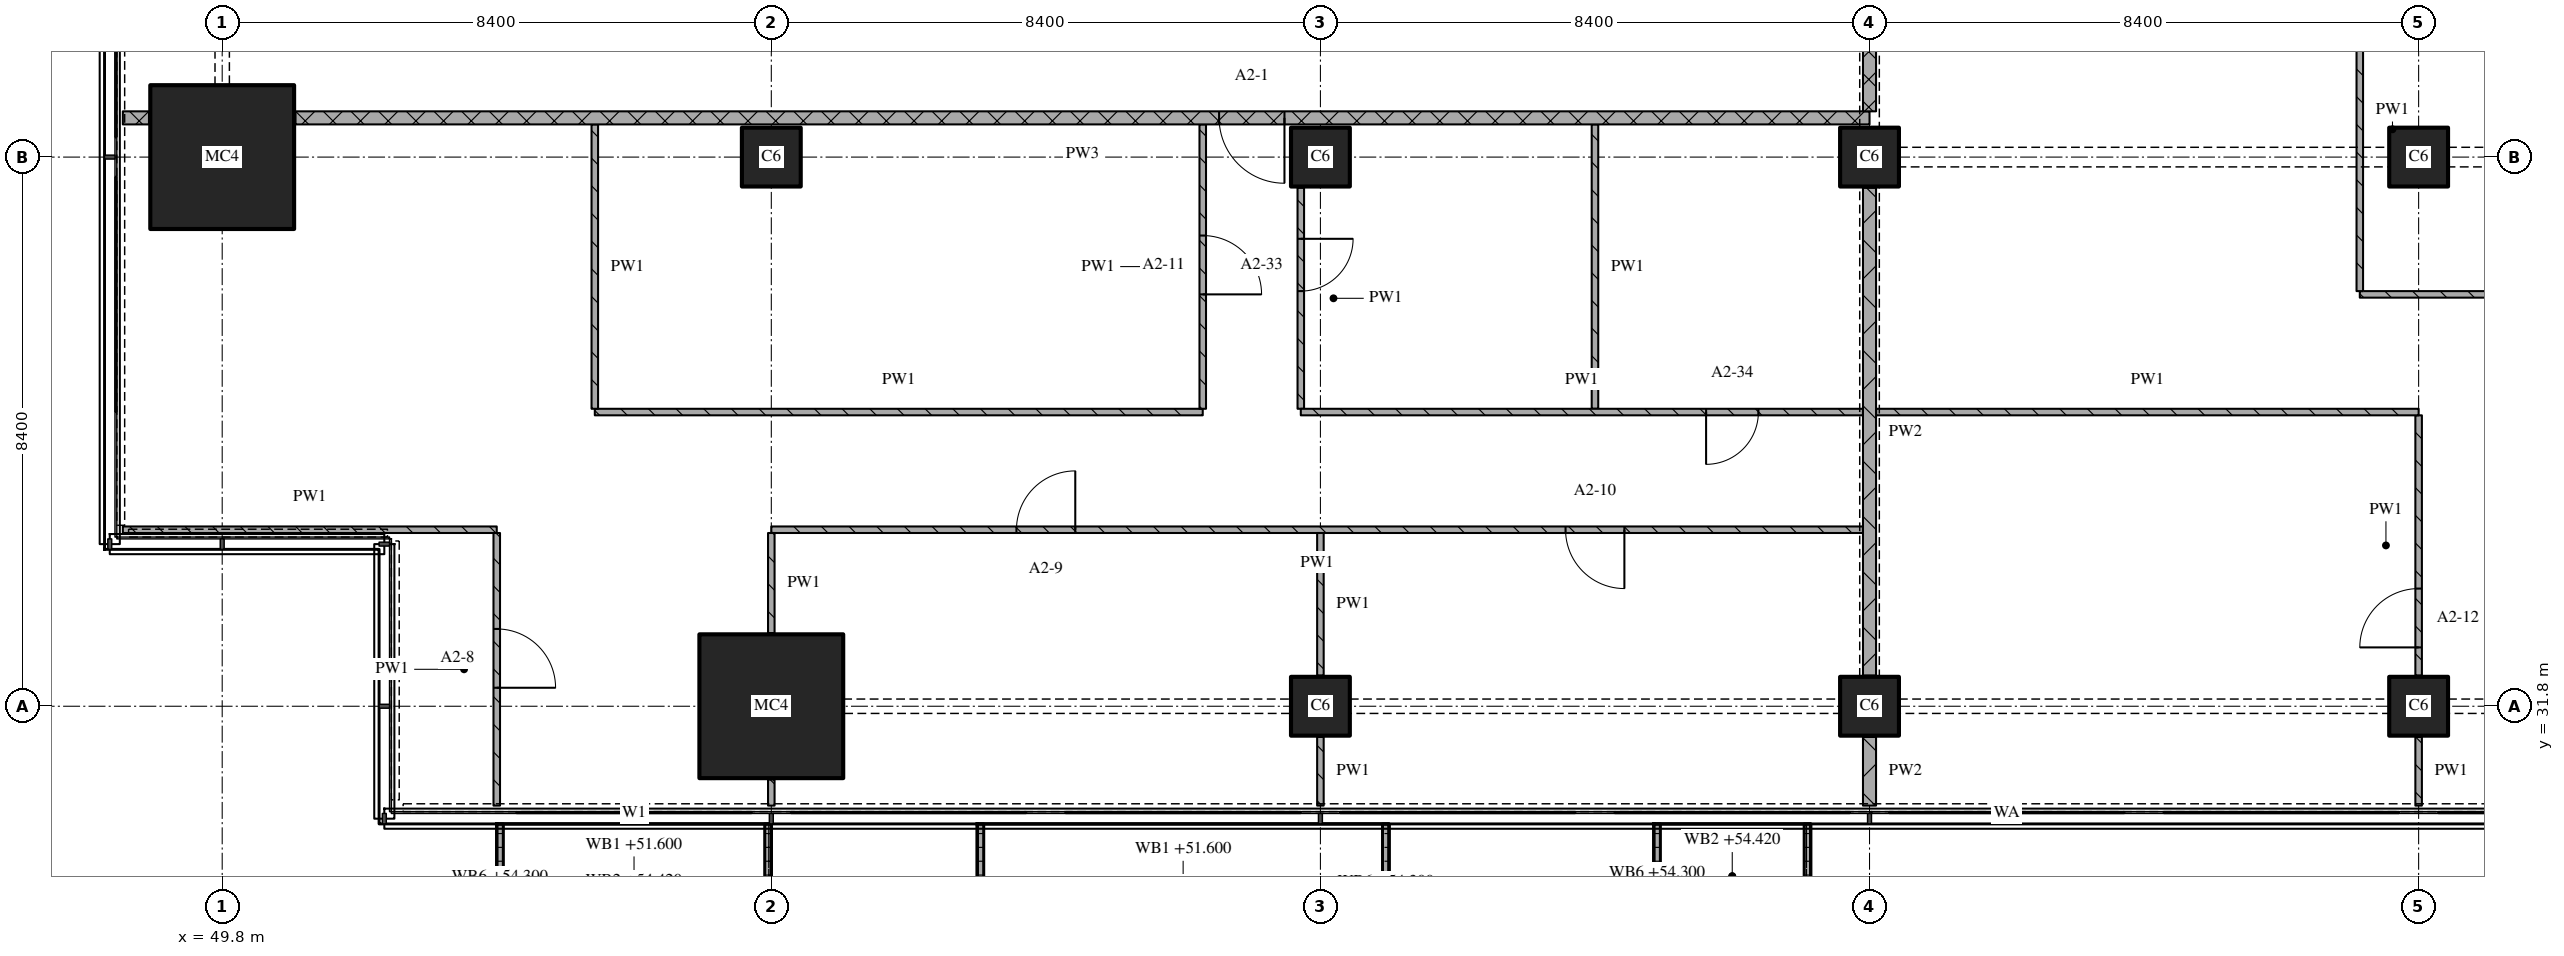
"""IFC4 building model, lengths in metres.
Left out: names, types, materials, properties, quantities, classifications, styles, units other than length and angle.
Written with IfcOpenShell. Run it as: python <this file> out.ifc"""

import sys

from ifc_helpers import new_model, si_unit, direction, frame, frame_2d, origin, origin_2d, place, context, subcontext, project, spatial, polyline, rectangle, outline, extrude, element, fill, save


model = new_model("IFC4")
c1 = context("Model", 3, precision=1e-05, world=origin(), true_north=direction((0.0, 1.0)))
c2 = subcontext(c1, "Body", "Model", "MODEL_VIEW")
j1 = project(units=[si_unit("LENGTHUNIT", "METRE"), si_unit("PLANEANGLEUNIT", "RADIAN")], contexts=[c1])
p1 = place(None, origin())
s1 = spatial("IfcSite", under=j1, at=p1, CompositionType="ELEMENT")
p2 = place(p1, origin())
s2 = spatial("IfcBuilding", under=s1, at=p2, CompositionType="ELEMENT")
p3 = place(p2, frame((0.0, 0.0, 51.6)))
s3 = spatial("IfcBuildingStorey", under=s2, at=p3, CompositionType="ELEMENT", Elevation=51.6)
for number, where, z_axis, x_axis in (
    (1, (49.8, 40.2, 0.0), (0.0, 0.0, 1.0), (1.0, 0.0, 0.0)),
    (2, (58.2, 31.8, 0.0), (0.0, 0.0, 1.0), (1.0, 0.0, 0.0)),
):
    element("IfcColumn", number, at=place(p3, frame(where, z_axis=z_axis, x_axis=x_axis)), inside=s3, PredefinedType="COLUMN", context=c2, shape_type="SweptSolid", body=[
        extrude(rectangle(XDim=2.2, YDim=2.2, at=origin_2d()), origin(), (0.0, 0.0, 1.0), 3.6),
    ])
for number, where, z_axis, x_axis in (
    (3, (58.2, 40.2, 0.0), (0.0, 0.0, 1.0), (1.0, 0.0, 0.0)),
    (4, (66.6, 31.8, 0.0), (0.0, 0.0, 1.0), (1.0, 0.0, 0.0)),
    (5, (66.6, 40.2, 0.0), (0.0, 0.0, 1.0), (1.0, 0.0, 0.0)),
    (6, (75.0, 31.8, 0.0), (0.0, 0.0, 1.0), (1.0, 0.0, 0.0)),
    (7, (75.0, 40.2, 0.0), (0.0, 0.0, 1.0), (1.0, 0.0, 0.0)),
    (8, (83.4, 31.8, 0.0), (0.0, 0.0, 1.0), (1.0, 0.0, 0.0)),
    (9, (83.4, 40.2, 0.0), (0.0, 0.0, 1.0), (1.0, 0.0, 0.0)),
):
    element("IfcColumn", number, at=place(p3, frame(where, z_axis=z_axis, x_axis=x_axis)), inside=s3, PredefinedType="COLUMN", context=c2, shape_type="SweptSolid", body=[
        extrude(rectangle(XDim=0.9, YDim=0.9, at=origin_2d()), origin(), (0.0, 0.0, 1.0), 3.6),
    ])
p4 = place(p3, origin())
e10 = element("IfcWall", 10, at=p4, inside=s3, PredefinedType="SOLIDWALL", context=c2, shape_type="SweptSolid", body=[
    extrude(outline(polyline([(54.0, 30.0), (54.1, 30.0), (54.1, 28.367), (58.1, 28.367), (58.1, 30.0), (58.2, 30.0), (58.2, 28.267), (54.0, 28.267), (54.0, 30.0)])), origin(), (0.0, 0.0, 1.0), 1.0),
])
p5 = place(p3, origin())
e11 = element("IfcWall", 11, at=p5, inside=s3, PredefinedType="SOLIDWALL", context=c2, shape_type="SweptSolid", body=[
    extrude(outline(polyline([(61.35, 30.0), (61.45, 30.0), (61.45, 28.233), (67.55, 28.233), (67.55, 30.0), (67.65, 30.0), (67.65, 28.133), (61.35, 28.133), (61.35, 30.0)])), origin(), (0.0, 0.0, 1.0), 1.0),
])
p6 = place(p3, origin())
e12 = element("IfcWall", 12, at=p6, inside=s3, PredefinedType="SOLIDWALL", context=c2, shape_type="SweptSolid", body=[
    extrude(outline(polyline([(71.7, 30.0), (71.8, 30.0), (71.8, 28.5), (74.0, 28.5), (74.0, 30.0), (74.1, 30.0), (74.1, 28.4), (71.7, 28.4), (71.7, 30.0)])), origin(), (0.0, 0.0, 1.0), 1.0),
])
p7 = place(p3, frame((48.28, 34.5, 0.0), z_axis=(0.0, 0.0, 1.0), x_axis=(1.0, 0.0, 0.0)))
e13 = element("IfcWall", 13, at=p7, inside=s3, PredefinedType="PARTITIONING", context=c2, shape_type="SweptSolid", body=[
    extrude(rectangle(XDim=5.72, YDim=0.1, at=frame_2d((2.86, 0.0))), origin(), (0.0, 0.0, 1.0), 3.32),
])
p8 = place(p3, frame((74.9, 34.5, 0.0), z_axis=(0.0, 0.0, 1.0), x_axis=(-1.0, 0.0, 0.0)))
e14 = element("IfcWall", 14, at=p8, inside=s3, PredefinedType="PARTITIONING", context=c2, shape_type="SweptSolid", body=[
    extrude(rectangle(XDim=16.7, YDim=0.1, at=frame_2d((8.35, 0.0))), origin(), (0.0, 0.0, 1.0), 3.32),
])
p9 = place(p8, frame((3.65, 0.0, 0.0)))
e15 = element("IfcOpeningElement", 15, at=p9, cuts=e14, PredefinedType="OPENING", context=c2, shape_type="SweptSolid", body=[
    extrude(rectangle(XDim=0.9, YDim=2.1, at=frame_2d((0.45, 1.05))), frame((0.0, 0.06, 0.0), z_axis=(0.0, -1.0, 0.0), x_axis=(1.0, 0.0, 0.0)), (0.0, 0.0, 1.0), 0.12),
])
p10 = place(p8, frame((12.05, 0.0, 0.0)))
e16 = element("IfcOpeningElement", 16, at=p10, cuts=e14, PredefinedType="OPENING", context=c2, shape_type="SweptSolid", body=[
    extrude(rectangle(XDim=0.9, YDim=2.1, at=frame_2d((0.45, 1.05))), frame((0.0, 0.06, 0.0), z_axis=(0.0, -1.0, 0.0), x_axis=(1.0, 0.0, 0.0)), (0.0, 0.0, 1.0), 0.12),
])
p11 = place(p3, frame((55.5, 36.3, 0.0), z_axis=(0.0, 0.0, 1.0), x_axis=(1.0, 0.0, 0.0)))
e17 = element("IfcWall", 17, at=p11, inside=s3, PredefinedType="PARTITIONING", context=c2, shape_type="SweptSolid", body=[
    extrude(rectangle(XDim=9.3, YDim=0.1, at=frame_2d((4.65, 0.0))), origin(), (0.0, 0.0, 1.0), 3.32),
])
p12 = place(p3, frame((82.5, 38.1, 0.0), z_axis=(0.0, 0.0, 1.0), x_axis=(1.0, 0.0, 0.0)))
e18 = element("IfcWall", 18, at=p12, inside=s3, PredefinedType="PARTITIONING", context=c2, shape_type="SweptSolid", body=[
    extrude(rectangle(XDim=8.4, YDim=0.1, at=frame_2d((4.2, 0.0))), origin(), (0.0, 0.0, 1.0), 3.32),
])
p13 = place(p3, frame((48.28, 40.8, 0.0), z_axis=(0.0, 0.0, 1.0), x_axis=(1.0, 0.0, 0.0)))
e19 = element("IfcWall", 19, at=p13, inside=s3, PredefinedType="PARTITIONING", context=c2, shape_type="SweptSolid", body=[
    extrude(rectangle(XDim=0.4, YDim=0.2, at=frame_2d((0.2, 0.0))), origin(), (0.0, 0.0, 1.0), 3.32),
])
p14 = place(p3, frame((75.0, 40.8, 0.0), z_axis=(0.0, 0.0, 1.0), x_axis=(-1.0, 0.0, 0.0)))
e20 = element("IfcWall", 20, at=p14, inside=s3, PredefinedType="PARTITIONING", context=c2, shape_type="SweptSolid", body=[
    extrude(rectangle(XDim=24.08, YDim=0.2, at=frame_2d((12.04, 0.0))), origin(), (0.0, 0.0, 1.0), 3.32),
])
p15 = place(p14, frame((8.95, 0.0, 0.0)))
e21 = element("IfcOpeningElement", 21, at=p15, cuts=e20, PredefinedType="OPENING", context=c2, shape_type="SweptSolid", body=[
    extrude(rectangle(XDim=1.0, YDim=2.1, at=frame_2d((0.5, 1.05))), frame((0.0, 0.11, 0.0), z_axis=(0.0, -1.0, 0.0), x_axis=(1.0, 0.0, 0.0)), (0.0, 0.0, 1.0), 0.22),
])
p16 = place(p3, frame((54.0, 30.28, 0.0), z_axis=(0.0, 0.0, 1.0), x_axis=(0.0, 1.0, 0.0)))
e22 = element("IfcWall", 22, at=p16, inside=s3, PredefinedType="PARTITIONING", context=c2, shape_type="SweptSolid", body=[
    extrude(rectangle(XDim=4.17, YDim=0.1, at=frame_2d((2.085, 0.0))), origin(), (0.0, 0.0, 1.0), 3.32),
])
p17 = place(p16, frame((1.803, 0.0, 0.0)))
e23 = element("IfcOpeningElement", 23, at=p17, cuts=e22, PredefinedType="OPENING", context=c2, shape_type="SweptSolid", body=[
    extrude(rectangle(XDim=0.9, YDim=2.1, at=frame_2d((0.45, 1.05))), frame((0.0, 0.06, 0.0), z_axis=(0.0, -1.0, 0.0), x_axis=(1.0, 0.0, 0.0)), (0.0, 0.0, 1.0), 0.12),
])
p18 = place(p3, frame((55.5, 40.7, 0.0), z_axis=(0.0, 0.0, 1.0), x_axis=(0.0, -1.0, 0.0)))
e24 = element("IfcWall", 24, at=p18, inside=s3, PredefinedType="PARTITIONING", context=c2, shape_type="SweptSolid", body=[
    extrude(rectangle(XDim=4.35, YDim=0.1, at=frame_2d((2.175, 0.0))), origin(), (0.0, 0.0, 1.0), 3.32),
])
p19 = place(p3, frame((58.2, 30.68, 0.0), z_axis=(0.0, 0.0, 1.0), x_axis=(0.0, -1.0, 0.0)))
e25 = element("IfcWall", 25, at=p19, inside=s3, PredefinedType="PARTITIONING", context=c2, shape_type="SweptSolid", body=[
    extrude(rectangle(XDim=0.4, YDim=0.1, at=frame_2d((0.2, 0.0))), origin(), (0.0, 0.0, 1.0), 3.32),
])
p20 = place(p3, frame((58.2, 34.45, 0.0), z_axis=(0.0, 0.0, 1.0), x_axis=(0.0, -1.0, 0.0)))
e26 = element("IfcWall", 26, at=p20, inside=s3, PredefinedType="PARTITIONING", context=c2, shape_type="SweptSolid", body=[
    extrude(rectangle(XDim=1.53, YDim=0.1, at=frame_2d((0.765, 0.0))), origin(), (0.0, 0.0, 1.0), 3.32),
])
p21 = place(p3, frame((64.8, 36.35, 0.0), z_axis=(0.0, 0.0, 1.0), x_axis=(0.0, 1.0, 0.0)))
e27 = element("IfcWall", 27, at=p21, inside=s3, PredefinedType="PARTITIONING", context=c2, shape_type="SweptSolid", body=[
    extrude(rectangle(XDim=4.35, YDim=0.1, at=frame_2d((2.175, 0.0))), origin(), (0.0, 0.0, 1.0), 3.32),
])
p22 = place(p21, frame((1.75, 0.0, 0.0)))
e28 = element("IfcOpeningElement", 28, at=p22, cuts=e27, PredefinedType="OPENING", context=c2, shape_type="SweptSolid", body=[
    extrude(rectangle(XDim=0.9, YDim=2.1, at=frame_2d((0.45, 1.05))), frame((0.0, 0.06, 0.0), z_axis=(0.0, -1.0, 0.0), x_axis=(1.0, 0.0, 0.0)), (0.0, 0.0, 1.0), 0.12),
])
p23 = place(p3, frame((66.3, 39.73, 0.0), z_axis=(0.0, 0.0, 1.0), x_axis=(0.0, -1.0, 0.0)))
e29 = element("IfcWall", 29, at=p23, inside=s3, PredefinedType="PARTITIONING", context=c2, shape_type="SweptSolid", body=[
    extrude(rectangle(XDim=3.38, YDim=0.1, at=frame_2d((1.69, 0.0))), origin(), (0.0, 0.0, 1.0), 3.32),
])
p24 = place(p23, frame((0.78, 0.0, 0.0)))
e30 = element("IfcOpeningElement", 30, at=p24, cuts=e29, PredefinedType="OPENING", context=c2, shape_type="SweptSolid", body=[
    extrude(rectangle(XDim=0.8, YDim=2.1, at=frame_2d((0.4, 1.05))), frame((0.0, 0.06, 0.0), z_axis=(0.0, -1.0, 0.0), x_axis=(1.0, 0.0, 0.0)), (0.0, 0.0, 1.0), 0.12),
])
p25 = place(p3, frame((66.6, 31.33, 0.0), z_axis=(0.0, 0.0, 1.0), x_axis=(0.0, -1.0, 0.0)))
e31 = element("IfcWall", 31, at=p25, inside=s3, PredefinedType="PARTITIONING", context=c2, shape_type="SweptSolid", body=[
    extrude(rectangle(XDim=1.05, YDim=0.1, at=frame_2d((0.525, 0.0))), origin(), (0.0, 0.0, 1.0), 3.32),
])
p26 = place(p3, frame((66.6, 34.45, 0.0), z_axis=(0.0, 0.0, 1.0), x_axis=(0.0, -1.0, 0.0)))
e32 = element("IfcWall", 32, at=p26, inside=s3, PredefinedType="PARTITIONING", context=c2, shape_type="SweptSolid", body=[
    extrude(rectangle(XDim=2.18, YDim=0.1, at=frame_2d((1.09, 0.0))), origin(), (0.0, 0.0, 1.0), 3.32),
])
p27 = place(p3, frame((70.8, 40.7, 0.0), z_axis=(0.0, 0.0, 1.0), x_axis=(0.0, -1.0, 0.0)))
e33 = element("IfcWall", 33, at=p27, inside=s3, PredefinedType="PARTITIONING", context=c2, shape_type="SweptSolid", body=[
    extrude(rectangle(XDim=4.35, YDim=0.1, at=frame_2d((2.175, 0.0))), origin(), (0.0, 0.0, 1.0), 3.32),
])
p28 = place(p3, frame((75.0, 43.1, 0.0), z_axis=(0.0, 0.0, 1.0), x_axis=(0.0, -1.0, 0.0)))
e34 = element("IfcWall", 34, at=p28, inside=s3, PredefinedType="PARTITIONING", context=c2, shape_type="SweptSolid", body=[
    extrude(rectangle(XDim=2.2, YDim=0.2, at=frame_2d((1.1, 0.0))), origin(), (0.0, 0.0, 1.0), 2.43),
])
p29 = place(p3, frame((75.0, 31.33, 0.0), z_axis=(0.0, 0.0, 1.0), x_axis=(0.0, -1.0, 0.0)))
e35 = element("IfcWall", 35, at=p29, inside=s3, PredefinedType="PARTITIONING", context=c2, shape_type="SweptSolid", body=[
    extrude(rectangle(XDim=1.05, YDim=0.2, at=frame_2d((0.525, 0.0))), origin(), (0.0, 0.0, 1.0), 3.32),
])
p30 = place(p3, frame((75.0, 39.73, 0.0), z_axis=(0.0, 0.0, 1.0), x_axis=(0.0, -1.0, 0.0)))
e36 = element("IfcWall", 36, at=p30, inside=s3, PredefinedType="PARTITIONING", context=c2, shape_type="SweptSolid", body=[
    extrude(rectangle(XDim=7.46, YDim=0.2, at=frame_2d((3.73, 0.0))), origin(), (0.0, 0.0, 1.0), 2.83),
])
p31 = place(p3, frame((82.5, 43.1, 0.0), z_axis=(0.0, 0.0, 1.0), x_axis=(0.0, -1.0, 0.0)))
e37 = element("IfcWall", 37, at=p31, inside=s3, PredefinedType="PARTITIONING", context=c2, shape_type="SweptSolid", body=[
    extrude(rectangle(XDim=4.95, YDim=0.1, at=frame_2d((2.475, 0.0))), origin(), (0.0, 0.0, 1.0), 3.32),
])
p32 = place(p3, frame((83.4, 31.33, 0.0), z_axis=(0.0, 0.0, 1.0), x_axis=(0.0, -1.0, 0.0)))
e38 = element("IfcWall", 38, at=p32, inside=s3, PredefinedType="PARTITIONING", context=c2, shape_type="SweptSolid", body=[
    extrude(rectangle(XDim=1.05, YDim=0.1, at=frame_2d((0.525, 0.0))), origin(), (0.0, 0.0, 1.0), 3.32),
])
p33 = place(p3, frame((83.4, 32.27, 0.0), z_axis=(0.0, 0.0, 1.0), x_axis=(0.0, 1.0, 0.0)))
e39 = element("IfcWall", 39, at=p33, inside=s3, PredefinedType="PARTITIONING", context=c2, shape_type="SweptSolid", body=[
    extrude(rectangle(XDim=3.98, YDim=0.1, at=frame_2d((1.99, 0.0))), origin(), (0.0, 0.0, 1.0), 3.32),
])
p34 = place(p33, frame((0.43, 0.0, 0.0)))
e40 = element("IfcOpeningElement", 40, at=p34, cuts=e39, PredefinedType="OPENING", context=c2, shape_type="SweptSolid", body=[
    extrude(rectangle(XDim=0.9, YDim=2.1, at=frame_2d((0.45, 1.05))), frame((0.0, 0.06, 0.0), z_axis=(0.0, -1.0, 0.0), x_axis=(1.0, 0.0, 0.0)), (0.0, 0.0, 1.0), 0.12),
])
p35 = place(p3, frame((66.3, 36.3, 0.0), z_axis=(0.0, 0.0, 1.0), x_axis=(1.0, 0.0, 0.0)))
e41 = element("IfcWall", 41, at=p35, inside=s3, PredefinedType="PARTITIONING", context=c2, shape_type="SweptSolid", body=[
    extrude(rectangle(XDim=8.6, YDim=0.1, at=frame_2d((4.3, 0.0))), origin(), (0.0, 0.0, 1.0), 3.32),
])
p36 = place(p35, frame((6.2, 0.0, 0.0)))
e42 = element("IfcOpeningElement", 42, at=p36, cuts=e41, PredefinedType="OPENING", context=c2, shape_type="SweptSolid", body=[
    extrude(rectangle(XDim=0.8, YDim=2.1, at=frame_2d((0.4, 1.05))), frame((0.0, 0.06, 0.0), z_axis=(0.0, -1.0, 0.0), x_axis=(1.0, 0.0, 0.0)), (0.0, 0.0, 1.0), 0.12),
])
p37 = place(p3, frame((75.1, 36.3, 0.0), z_axis=(0.0, 0.0, 1.0), x_axis=(1.0, 0.0, 0.0)))
e43 = element("IfcWall", 43, at=p37, inside=s3, PredefinedType="PARTITIONING", context=c2, shape_type="SweptSolid", body=[
    extrude(rectangle(XDim=8.3, YDim=0.1, at=frame_2d((4.15, 0.0))), origin(), (0.0, 0.0, 1.0), 3.32),
])
p38 = place(p9, origin())
e44 = element("IfcDoor", 44, at=p38, inside=s3, OperationType="SINGLE_SWING_LEFT", PredefinedType="DOOR", context=c2, shape_type="SweptSolid", body=[
    extrude(rectangle(XDim=0.9, YDim=2.1, at=frame_2d((0.45, 1.05))), frame((0.0, 0.025, 0.0), z_axis=(0.0, -1.0, 0.0), x_axis=(1.0, 0.0, 0.0)), (0.0, 0.0, 1.0), 0.05),
])
fill(e15, e44)
p39 = place(p10, origin())
e45 = element("IfcDoor", 45, at=p39, inside=s3, OperationType="SINGLE_SWING_RIGHT", PredefinedType="DOOR", context=c2, shape_type="SweptSolid", body=[
    extrude(rectangle(XDim=0.9, YDim=2.1, at=frame_2d((0.45, 1.05))), frame((0.0, 0.025, 0.0), z_axis=(0.0, -1.0, 0.0), x_axis=(1.0, 0.0, 0.0)), (0.0, 0.0, 1.0), 0.05),
])
fill(e16, e45)
p40 = place(p15, origin())
e46 = element("IfcDoor", 46, at=p40, inside=s3, OperationType="SINGLE_SWING_LEFT", PredefinedType="DOOR", context=c2, shape_type="SweptSolid", body=[
    extrude(rectangle(XDim=1.0, YDim=2.1, at=frame_2d((0.5, 1.05))), frame((0.0, 0.025, 0.0), z_axis=(0.0, -1.0, 0.0), x_axis=(1.0, 0.0, 0.0)), (0.0, 0.0, 1.0), 0.05),
])
fill(e21, e46)
p41 = place(p17, origin())
e47 = element("IfcDoor", 47, at=p41, inside=s3, OperationType="SINGLE_SWING_RIGHT", PredefinedType="DOOR", context=c2, shape_type="SweptSolid", body=[
    extrude(rectangle(XDim=0.9, YDim=2.1, at=frame_2d((0.45, 1.05))), frame((0.0, 0.025, 0.0), z_axis=(0.0, -1.0, 0.0), x_axis=(1.0, 0.0, 0.0)), (0.0, 0.0, 1.0), 0.05),
])
fill(e23, e47)
p42 = place(p22, origin())
e48 = element("IfcDoor", 48, at=p42, inside=s3, OperationType="SINGLE_SWING_RIGHT", PredefinedType="DOOR", context=c2, shape_type="SweptSolid", body=[
    extrude(rectangle(XDim=0.9, YDim=2.1, at=frame_2d((0.45, 1.05))), frame((0.0, 0.025, 0.0), z_axis=(0.0, -1.0, 0.0), x_axis=(1.0, 0.0, 0.0)), (0.0, 0.0, 1.0), 0.05),
])
fill(e28, e48)
p43 = place(p24, origin())
e49 = element("IfcDoor", 49, at=p43, inside=s3, OperationType="SINGLE_SWING_LEFT", PredefinedType="DOOR", context=c2, shape_type="SweptSolid", body=[
    extrude(rectangle(XDim=0.8, YDim=2.1, at=frame_2d((0.4, 1.05))), frame((0.0, 0.025, 0.0), z_axis=(0.0, -1.0, 0.0), x_axis=(1.0, 0.0, 0.0)), (0.0, 0.0, 1.0), 0.05),
])
fill(e30, e49)
p44 = place(p34, origin())
e50 = element("IfcDoor", 50, at=p44, inside=s3, OperationType="SINGLE_SWING_LEFT", PredefinedType="DOOR", context=c2, shape_type="SweptSolid", body=[
    extrude(rectangle(XDim=0.9, YDim=2.1, at=frame_2d((0.45, 1.05))), frame((0.0, 0.025, 0.0), z_axis=(0.0, -1.0, 0.0), x_axis=(1.0, 0.0, 0.0)), (0.0, 0.0, 1.0), 0.05),
])
fill(e40, e50)
p45 = place(p36, origin())
e51 = element("IfcDoor", 51, at=p45, inside=s3, OperationType="SINGLE_SWING_RIGHT", PredefinedType="DOOR", context=c2, shape_type="SweptSolid", body=[
    extrude(rectangle(XDim=0.8, YDim=2.1, at=frame_2d((0.4, 1.05))), frame((0.0, 0.025, 0.0), z_axis=(0.0, -1.0, 0.0), x_axis=(1.0, 0.0, 0.0)), (0.0, 0.0, 1.0), 0.05),
])
fill(e42, e51)
save(model, sys.argv[1])
